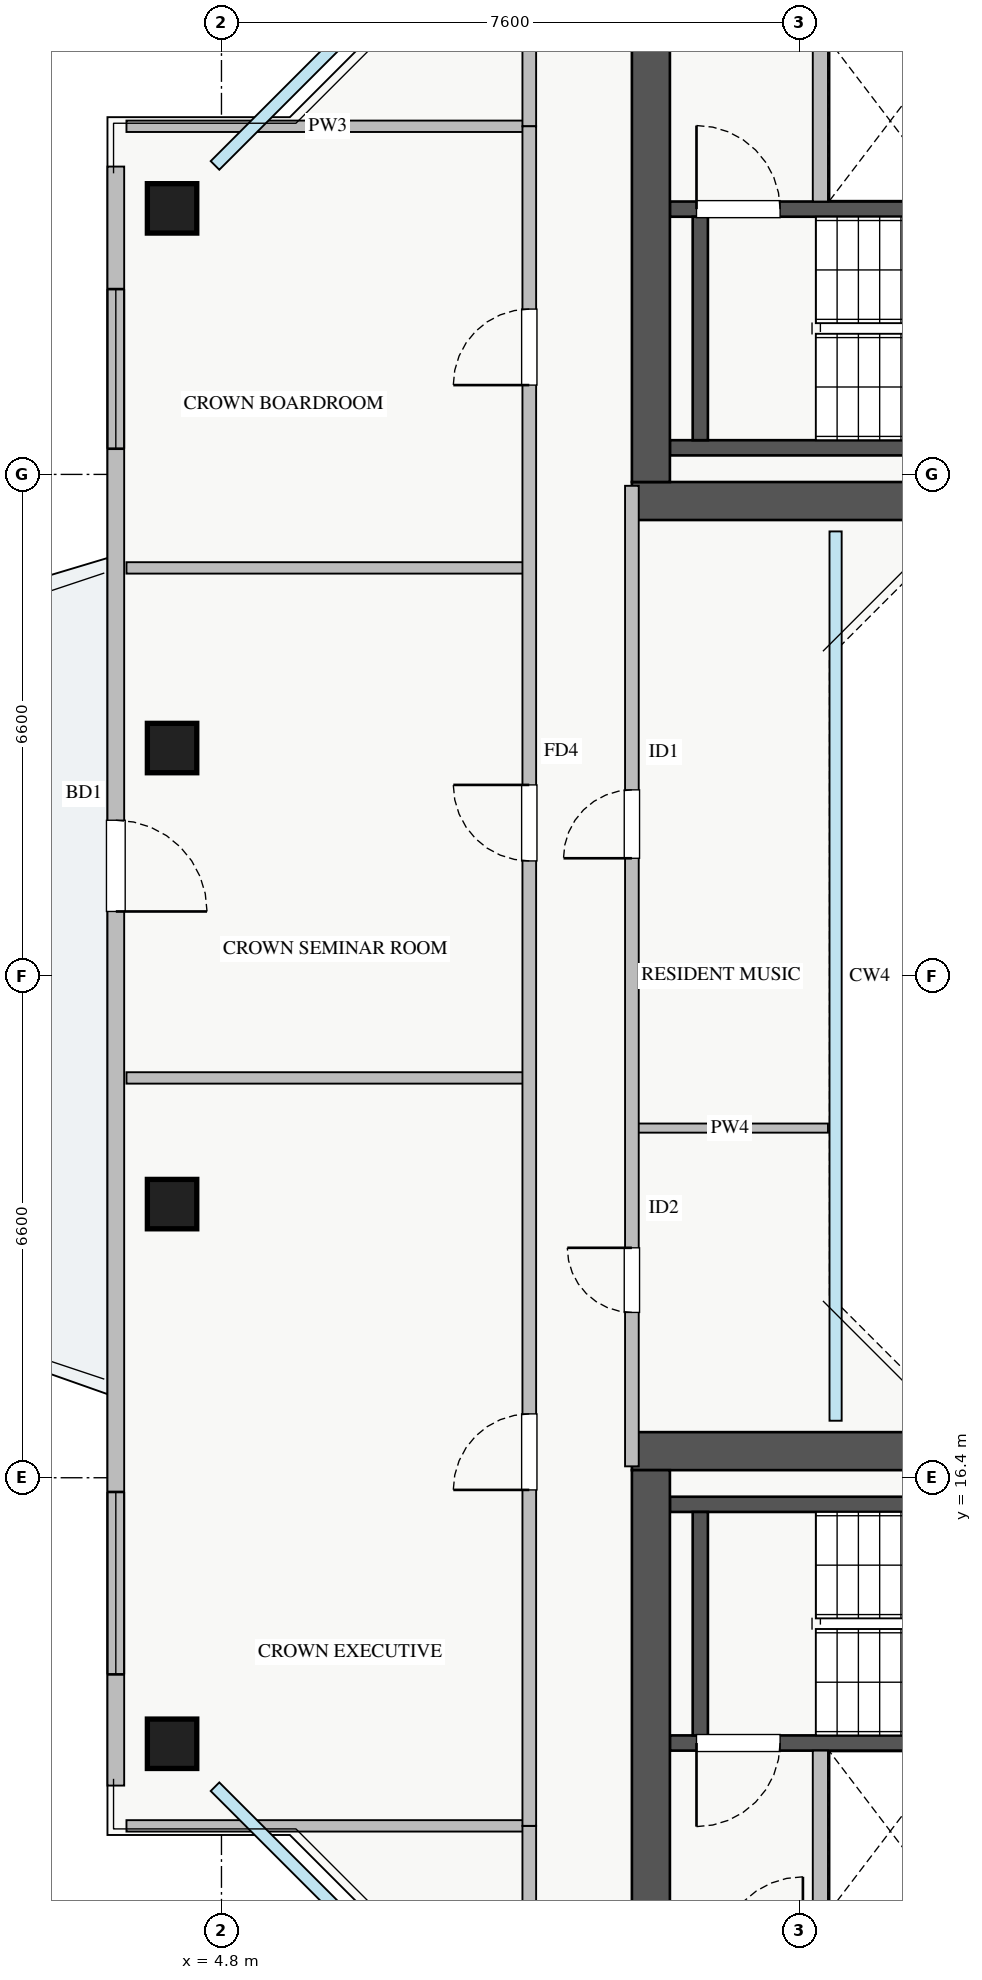
"""IFC4 building model, lengths in metres.
Left out: names, types, materials, properties, quantities, classifications, styles, units other than length and angle.
Written with IfcOpenShell. Run it as: python <this file> out.ifc"""

import sys

from ifc_helpers import new_model, si_unit, direction, frame, frame_2d, origin, origin_2d, place, context, subcontext, project, spatial, rectangle, extrude, source, transform, mapped, element, fill, save


model = new_model("IFC4")
c1 = context("Model", 3, precision=1e-05, world=origin(), true_north=direction((0.0, 1.0)))
c2 = subcontext(c1, "Body", "Model", "MODEL_VIEW")
j1 = project(units=[si_unit("LENGTHUNIT", "METRE"), si_unit("PLANEANGLEUNIT", "RADIAN")], contexts=[c1])
p1 = place(None, origin())
s1 = spatial("IfcSite", under=j1, at=p1, CompositionType="ELEMENT")
p2 = place(p1, origin())
s2 = spatial("IfcBuilding", under=s1, at=p2, CompositionType="ELEMENT")
p3 = place(p2, frame((0.0, 0.0, 240.5)))
s3 = spatial("IfcBuildingStorey", under=s2, at=p3, CompositionType="ELEMENT", Elevation=240.5)
for number, where, z_axis, x_axis in (
    (1, (12.68, 33.2, 0.0), (0.0, 0.0, 1.0), (1.0, 0.0, 0.0)),
    (2, (12.68, 12.8, 0.0), (0.0, 0.0, 1.0), (1.0, 0.0, 0.0)),
):
    element("IfcWall", number, at=place(p3, frame(where, z_axis=z_axis, x_axis=x_axis)), inside=s3, PredefinedType="SHEAR", context=c2, shape_type="SweptSolid", body=[
        extrude(rectangle(XDim=1.94, YDim=0.18, at=frame_2d((0.97, 0.0))), origin(), (0.0, 0.0, 1.0), 3.07),
    ])
p4 = place(p3, frame((10.7, 29.95, 0.0), z_axis=(0.0, 0.0, 1.0), x_axis=(1.0, 0.0, 0.0)))
e3 = element("IfcWall", 3, at=p4, inside=s3, PredefinedType="SHEAR", context=c2, shape_type="SweptSolid", body=[
    extrude(rectangle(XDim=7.45, YDim=0.2, at=frame_2d((3.725, 0.0))), origin(), (0.0, 0.0, 1.0), 3.25),
])
p5 = place(p3, frame((10.7, 33.09, 0.0), z_axis=(0.0, 0.0, 1.0), x_axis=(1.0, 0.0, 0.0)))
e4 = element("IfcWall", 4, at=p5, inside=s3, PredefinedType="SHEAR", context=c2, shape_type="SweptSolid", body=[
    extrude(rectangle(XDim=7.45, YDim=0.2, at=frame_2d((3.725, 0.0))), origin(), (0.0, 0.0, 1.0), 3.25),
])
p6 = place(p5, frame((0.35, 0.0, 0.0)))
e5 = element("IfcOpeningElement", 5, at=p6, cuts=e4, PredefinedType="OPENING", context=c2, shape_type="SweptSolid", body=[
    extrude(rectangle(XDim=1.1, YDim=2.05, at=frame_2d((0.55, 1.025))), frame((0.0, 0.11, 0.0), z_axis=(0.0, -1.0, 0.0), x_axis=(1.0, 0.0, 0.0)), (0.0, 0.0, 1.0), 0.22),
])
p7 = place(p3, frame((11.1, 30.05, 0.0), z_axis=(0.0, 0.0, 1.0), x_axis=(0.0, 1.0, 0.0)))
e6 = element("IfcWall", 6, at=p7, inside=s3, PredefinedType="SHEAR", context=c2, shape_type="SweptSolid", body=[
    extrude(rectangle(XDim=2.94, YDim=0.2, at=frame_2d((1.47, 0.0))), origin(), (0.0, 0.0, 1.0), 3.25),
])
p8 = place(p3, frame((10.7, 12.91, 0.0), z_axis=(0.0, 0.0, 1.0), x_axis=(1.0, 0.0, 0.0)))
e7 = element("IfcWall", 7, at=p8, inside=s3, PredefinedType="SHEAR", context=c2, shape_type="SweptSolid", body=[
    extrude(rectangle(XDim=7.45, YDim=0.2, at=frame_2d((3.725, 0.0))), origin(), (0.0, 0.0, 1.0), 3.25),
])
p9 = place(p8, frame((0.35, 0.0, 0.0)))
e8 = element("IfcOpeningElement", 8, at=p9, cuts=e7, PredefinedType="OPENING", context=c2, shape_type="SweptSolid", body=[
    extrude(rectangle(XDim=1.1, YDim=2.05, at=frame_2d((0.55, 1.025))), frame((0.0, 0.11, 0.0), z_axis=(0.0, -1.0, 0.0), x_axis=(1.0, 0.0, 0.0)), (0.0, 0.0, 1.0), 0.22),
])
p10 = place(p3, frame((10.7, 16.05, 0.0), z_axis=(0.0, 0.0, 1.0), x_axis=(1.0, 0.0, 0.0)))
e9 = element("IfcWall", 9, at=p10, inside=s3, PredefinedType="SHEAR", context=c2, shape_type="SweptSolid", body=[
    extrude(rectangle(XDim=7.45, YDim=0.2, at=frame_2d((3.725, 0.0))), origin(), (0.0, 0.0, 1.0), 3.25),
])
p11 = place(p3, frame((11.1, 13.01, 0.0), z_axis=(0.0, 0.0, 1.0), x_axis=(0.0, 1.0, 0.0)))
e10 = element("IfcWall", 10, at=p11, inside=s3, PredefinedType="SHEAR", context=c2, shape_type="SweptSolid", body=[
    extrude(rectangle(XDim=2.94, YDim=0.2, at=frame_2d((1.47, 0.0))), origin(), (0.0, 0.0, 1.0), 3.25),
])
p12 = place(p3, frame((10.2, 29.25, 0.0), z_axis=(0.0, 0.0, 1.0), x_axis=(1.0, 0.0, 0.0)))
e11 = element("IfcWall", 11, at=p12, inside=s3, PredefinedType="SHEAR", context=c2, shape_type="SweptSolid", body=[
    extrude(rectangle(XDim=17.6, YDim=0.5, at=frame_2d((8.8, 0.0))), origin(), (0.0, 0.0, 1.0), 3.25),
])
p13 = place(p3, frame((10.45, 29.5, 0.0), z_axis=(0.0, 0.0, 1.0), x_axis=(0.0, 1.0, 0.0)))
e12 = element("IfcWall", 12, at=p13, inside=s3, PredefinedType="SHEAR", context=c2, shape_type="SweptSolid", body=[
    extrude(rectangle(XDim=6.2, YDim=0.5, at=frame_2d((3.1, 0.0))), origin(), (0.0, 0.0, 1.0), 3.25),
])
p14 = place(p3, frame((10.2, 16.75, 0.0), z_axis=(0.0, 0.0, 1.0), x_axis=(1.0, 0.0, 0.0)))
e13 = element("IfcWall", 13, at=p14, inside=s3, PredefinedType="SHEAR", context=c2, shape_type="SweptSolid", body=[
    extrude(rectangle(XDim=17.6, YDim=0.5, at=frame_2d((8.8, 0.0))), origin(), (0.0, 0.0, 1.0), 3.25),
])
p15 = place(p3, frame((10.45, 10.3, 0.0), z_axis=(0.0, 0.0, 1.0), x_axis=(0.0, 1.0, 0.0)))
e14 = element("IfcWall", 14, at=p15, inside=s3, PredefinedType="SHEAR", context=c2, shape_type="SweptSolid", body=[
    extrude(rectangle(XDim=6.2, YDim=0.5, at=frame_2d((3.1, 0.0))), origin(), (0.0, 0.0, 1.0), 3.25),
])
m1 = source(origin(), c2, "Body", "SweptSolid", [
    extrude(rectangle(XDim=0.65, YDim=0.65, at=origin_2d()), origin(), (0.0, 0.0, 1.0), 3.25),
])
for number, where, z_axis, x_axis in (
    (15, (4.15, 33.1, 0.0), (0.0, 0.0, 1.0), (1.0, 0.0, 0.0)),
    (16, (4.15, 26.0, 0.0), (0.0, 0.0, 1.0), (1.0, 0.0, 0.0)),
    (17, (4.15, 20.0, 0.0), (0.0, 0.0, 1.0), (1.0, 0.0, 0.0)),
    (18, (4.15, 12.9, 0.0), (0.0, 0.0, 1.0), (1.0, 0.0, 0.0)),
):
    element("IfcColumn", number, at=place(p3, frame(where, z_axis=z_axis, x_axis=x_axis)), inside=s3, PredefinedType="COLUMN", context=c2, shape_type="MappedRepresentation", body=[
        mapped(m1, transform((0.0, 0.0, 0.0), x_axis=(1.0, 0.0, 0.0), y_axis=(0.0, 1.0, 0.0), z_axis=(0.0, 0.0, 1.0), scale=1.0)),
    ])
p16 = place(p3, frame((3.41, 12.35, 0.0), z_axis=(0.0, 0.0, 1.0), x_axis=(0.0, 1.0, 0.0)))
e19 = element("IfcWall", 19, at=p16, inside=s3, PredefinedType="STANDARD", context=c2, shape_type="SweptSolid", body=[
    extrude(rectangle(XDim=21.3, YDim=0.22, at=frame_2d((10.65, 0.0))), origin(), (0.0, 0.0, 1.0), 2.61),
])
p17 = place(p16, frame((11.5, 0.0, 0.0)))
e20 = element("IfcOpeningElement", 20, at=p17, cuts=e19, PredefinedType="OPENING", context=c2, shape_type="SweptSolid", body=[
    extrude(rectangle(XDim=1.2, YDim=2.1, at=frame_2d((0.6, 1.05))), frame((0.0, 0.12, 0.0), z_axis=(0.0, -1.0, 0.0), x_axis=(1.0, 0.0, 0.0)), (0.0, 0.0, 1.0), 0.24),
])
p18 = place(p16, frame((1.463, 0.0, 0.9)))
e21 = element("IfcOpeningElement", 21, at=p18, cuts=e19, PredefinedType="OPENING", context=c2, shape_type="SweptSolid", body=[
    extrude(rectangle(XDim=2.4, YDim=1.48, at=frame_2d((1.2, 0.74))), frame((0.0, 0.12, 0.0), z_axis=(0.0, -1.0, 0.0), x_axis=(1.0, 0.0, 0.0)), (0.0, 0.0, 1.0), 0.24),
])
p19 = place(p16, frame((17.588, 0.0, 0.9)))
e22 = element("IfcOpeningElement", 22, at=p19, cuts=e19, PredefinedType="OPENING", context=c2, shape_type="SweptSolid", body=[
    extrude(rectangle(XDim=2.1, YDim=1.48, at=frame_2d((1.05, 0.74))), frame((0.0, 0.12, 0.0), z_axis=(0.0, -1.0, 0.0), x_axis=(1.0, 0.0, 0.0)), (0.0, 0.0, 1.0), 0.24),
])
for number, where, z_axis, x_axis in (
    (23, (12.68, 33.19, 0.0), (0.0, 0.0, 1.0), (0.0, 1.0, 0.0)),
    (24, (12.68, 10.6, 0.0), (0.0, 0.0, 1.0), (0.0, 1.0, 0.0)),
):
    element("IfcWall", number, at=place(p3, frame(where, z_axis=z_axis, x_axis=x_axis)), inside=s3, PredefinedType="PARTITIONING", context=c2, shape_type="SweptSolid", body=[
        extrude(rectangle(XDim=2.21, YDim=0.2, at=frame_2d((1.105, 0.0))), origin(), (0.0, 0.0, 1.0), 3.07),
    ])
for number, where, z_axis, x_axis in (
    (25, (3.55, 34.18, 0.0), (0.0, 0.0, 1.0), (1.0, 0.0, 0.0)),
    (26, (3.55, 11.82, 0.0), (0.0, 0.0, 1.0), (1.0, 0.0, 0.0)),
):
    element("IfcWall", number, at=place(p3, frame(where, z_axis=z_axis, x_axis=x_axis)), inside=s3, PredefinedType="PARTITIONING", context=c2, shape_type="SweptSolid", body=[
        extrude(rectangle(XDim=5.3, YDim=0.15, at=frame_2d((2.65, 0.0))), origin(), (0.0, 0.0, 1.0), 3.07),
    ])
for number, where, z_axis, x_axis in (
    (27, (8.85, 34.18, 0.0), (0.0, 0.0, 1.0), (0.0, 1.0, 0.0)),
    (28, (8.85, 8.56, 0.0), (0.0, 0.0, 1.0), (0.0, 1.0, 0.0)),
):
    element("IfcWall", number, at=place(p3, frame(where, z_axis=z_axis, x_axis=x_axis)), inside=s3, PredefinedType="PARTITIONING", context=c2, shape_type="SweptSolid", body=[
        extrude(rectangle(XDim=3.26, YDim=0.18, at=frame_2d((1.63, 0.0))), origin(), (0.0, 0.0, 1.0), 2.569),
    ])
p20 = place(p3, frame((3.55, 21.66, 0.0), z_axis=(0.0, 0.0, 1.0), x_axis=(1.0, 0.0, 0.0)))
e29 = element("IfcWall", 29, at=p20, inside=s3, PredefinedType="PARTITIONING", context=c2, shape_type="SweptSolid", body=[
    extrude(rectangle(XDim=5.3, YDim=0.15, at=frame_2d((2.65, 0.0))), origin(), (0.0, 0.0, 1.0), 2.765),
])
p21 = place(p3, frame((3.55, 28.37, 0.0), z_axis=(0.0, 0.0, 1.0), x_axis=(1.0, 0.0, 0.0)))
e30 = element("IfcWall", 30, at=p21, inside=s3, PredefinedType="PARTITIONING", context=c2, shape_type="SweptSolid", body=[
    extrude(rectangle(XDim=5.3, YDim=0.15, at=frame_2d((2.65, 0.0))), origin(), (0.0, 0.0, 1.0), 3.07),
])
p22 = place(p3, frame((8.85, 11.82, 0.0), z_axis=(0.0, 0.0, 1.0), x_axis=(0.0, 1.0, 0.0)))
e31 = element("IfcWall", 31, at=p22, inside=s3, PredefinedType="PARTITIONING", context=c2, shape_type="SweptSolid", body=[
    extrude(rectangle(XDim=22.36, YDim=0.18, at=frame_2d((11.18, 0.0))), origin(), (0.0, 0.0, 1.0), 2.569),
])
p23 = place(p22, frame((4.42, 0.0, 0.0)))
e32 = element("IfcOpeningElement", 32, at=p23, cuts=e31, PredefinedType="OPENING", context=c2, shape_type="SweptSolid", body=[
    extrude(rectangle(XDim=1.0, YDim=2.05, at=frame_2d((0.5, 1.025))), frame((0.0, 0.1, 0.0), z_axis=(0.0, -1.0, 0.0), x_axis=(1.0, 0.0, 0.0)), (0.0, 0.0, 1.0), 0.2),
])
p24 = place(p22, frame((12.695, 0.0, 0.0)))
e33 = element("IfcOpeningElement", 33, at=p24, cuts=e31, PredefinedType="OPENING", context=c2, shape_type="SweptSolid", body=[
    extrude(rectangle(XDim=1.0, YDim=2.05, at=frame_2d((0.5, 1.025))), frame((0.0, 0.1, 0.0), z_axis=(0.0, -1.0, 0.0), x_axis=(1.0, 0.0, 0.0)), (0.0, 0.0, 1.0), 0.2),
])
p25 = place(p22, frame((18.955, 0.0, 0.0)))
e34 = element("IfcOpeningElement", 34, at=p25, cuts=e31, PredefinedType="OPENING", context=c2, shape_type="SweptSolid", body=[
    extrude(rectangle(XDim=1.0, YDim=2.05, at=frame_2d((0.5, 1.025))), frame((0.0, 0.1, 0.0), z_axis=(0.0, -1.0, 0.0), x_axis=(1.0, 0.0, 0.0)), (0.0, 0.0, 1.0), 0.2),
])
p26 = place(p3, frame((10.2, 21.0, 0.0), z_axis=(0.0, 0.0, 1.0), x_axis=(1.0, 0.0, 0.0)))
e35 = element("IfcWall", 35, at=p26, inside=s3, PredefinedType="PLUMBINGWALL", context=c2, shape_type="SweptSolid", body=[
    extrude(rectangle(XDim=2.58, YDim=0.12, at=frame_2d((1.29, 0.0))), origin(), (0.0, 0.0, 1.0), 3.07),
])
p27 = place(p3, frame((10.2, 16.55, 0.0), z_axis=(0.0, 0.0, 1.0), x_axis=(0.0, 1.0, 0.0)))
e36 = element("IfcWall", 36, at=p27, inside=s3, PredefinedType="PARTITIONING", context=c2, shape_type="SweptSolid", body=[
    extrude(rectangle(XDim=12.9, YDim=0.18, at=frame_2d((6.45, 0.0))), origin(), (0.0, 0.0, 1.0), 3.07),
])
p28 = place(p27, frame((2.025, 0.0, 0.0)))
e37 = element("IfcOpeningElement", 37, at=p28, cuts=e36, PredefinedType="OPENING", context=c2, shape_type="SweptSolid", body=[
    extrude(rectangle(XDim=0.85, YDim=2.05, at=frame_2d((0.425, 1.025))), frame((0.0, 0.1, 0.0), z_axis=(0.0, -1.0, 0.0), x_axis=(1.0, 0.0, 0.0)), (0.0, 0.0, 1.0), 0.2),
])
p29 = place(p27, frame((8.0, 0.0, 0.0)))
e38 = element("IfcOpeningElement", 38, at=p29, cuts=e36, PredefinedType="OPENING", context=c2, shape_type="SweptSolid", body=[
    extrude(rectangle(XDim=0.9, YDim=2.05, at=frame_2d((0.45, 1.025))), frame((0.0, 0.1, 0.0), z_axis=(0.0, -1.0, 0.0), x_axis=(1.0, 0.0, 0.0)), (0.0, 0.0, 1.0), 0.2),
])
m2 = source(origin(), c2, "Body", "SweptSolid", [
    extrude(rectangle(XDim=1.2, YDim=2.1, at=frame_2d((0.6, 1.05))), frame((0.0, 0.025, 0.0), z_axis=(0.0, -1.0, 0.0), x_axis=(1.0, 0.0, 0.0)), (0.0, 0.0, 1.0), 0.05),
])
p30 = place(p17, frame((1.2, 0.0, 0.0), z_axis=(0.0, 0.0, 1.0), x_axis=(-1.0, 0.0, 0.0)))
e39 = element("IfcDoor", 39, at=p30, inside=s3, OperationType="SINGLE_SWING_LEFT", PredefinedType="DOOR", context=c2, shape_type="MappedRepresentation", body=[
    mapped(m2, transform((0.0, 0.0, 0.0), x_axis=(1.0, 0.0, 0.0), y_axis=(0.0, 1.0, 0.0), z_axis=(0.0, 0.0, 1.0), scale=1.0)),
])
fill(e20, e39)
m3 = source(origin(), c2, "Body", "SweptSolid", [
    extrude(rectangle(XDim=2.4, YDim=1.48, at=frame_2d((1.2, 0.74))), frame((0.0, 0.03, 0.0), z_axis=(0.0, -1.0, 0.0), x_axis=(1.0, 0.0, 0.0)), (0.0, 0.0, 1.0), 0.06),
])
p31 = place(p18, origin())
e40 = element("IfcWindow", 40, at=p31, inside=s3, PartitioningType="TRIPLE_PANEL_VERTICAL", PredefinedType="WINDOW", context=c2, shape_type="MappedRepresentation", body=[
    mapped(m3, transform((0.0, 0.0, 0.0), x_axis=(1.0, 0.0, 0.0), y_axis=(0.0, 1.0, 0.0), z_axis=(0.0, 0.0, 1.0), scale=1.0)),
])
fill(e21, e40)
m4 = source(origin(), c2, "Body", "SweptSolid", [
    extrude(rectangle(XDim=2.1, YDim=1.48, at=frame_2d((1.05, 0.74))), frame((0.0, 0.03, 0.0), z_axis=(0.0, -1.0, 0.0), x_axis=(1.0, 0.0, 0.0)), (0.0, 0.0, 1.0), 0.06),
])
p32 = place(p19, origin())
e41 = element("IfcWindow", 41, at=p32, inside=s3, PartitioningType="TRIPLE_PANEL_VERTICAL", PredefinedType="WINDOW", context=c2, shape_type="MappedRepresentation", body=[
    mapped(m4, transform((0.0, 0.0, 0.0), x_axis=(1.0, 0.0, 0.0), y_axis=(0.0, 1.0, 0.0), z_axis=(0.0, 0.0, 1.0), scale=1.0)),
])
fill(e22, e41)
m5 = source(origin(), c2, "Body", "SweptSolid", [
    extrude(rectangle(XDim=1.1, YDim=2.05, at=frame_2d((0.55, 1.025))), frame((0.0, 0.025, 0.0), z_axis=(0.0, -1.0, 0.0), x_axis=(1.0, 0.0, 0.0)), (0.0, 0.0, 1.0), 0.05),
])
p33 = place(p6, origin())
e42 = element("IfcDoor", 42, at=p33, inside=s3, OperationType="SINGLE_SWING_LEFT", PredefinedType="DOOR", context=c2, shape_type="MappedRepresentation", body=[
    mapped(m5, transform((0.0, 0.0, 0.0), x_axis=(1.0, 0.0, 0.0), y_axis=(0.0, 1.0, 0.0), z_axis=(0.0, 0.0, 1.0), scale=1.0)),
])
fill(e5, e42)
p34 = place(p9, frame((1.1, 0.0, 0.0), z_axis=(0.0, 0.0, 1.0), x_axis=(-1.0, 0.0, 0.0)))
e43 = element("IfcDoor", 43, at=p34, inside=s3, OperationType="SINGLE_SWING_LEFT", PredefinedType="DOOR", context=c2, shape_type="MappedRepresentation", body=[
    mapped(m5, transform((0.0, 0.0, 0.0), x_axis=(1.0, 0.0, 0.0), y_axis=(0.0, 1.0, 0.0), z_axis=(0.0, 0.0, 1.0), scale=1.0)),
])
fill(e8, e43)
m6 = source(origin(), c2, "Body", "SweptSolid", [
    extrude(rectangle(XDim=1.0, YDim=2.05, at=frame_2d((0.5, 1.025))), frame((0.0, 0.025, 0.0), z_axis=(0.0, -1.0, 0.0), x_axis=(1.0, 0.0, 0.0)), (0.0, 0.0, 1.0), 0.05),
])
p35 = place(p23, origin())
e44 = element("IfcDoor", 44, at=p35, inside=s3, OperationType="SINGLE_SWING_LEFT", PredefinedType="DOOR", context=c2, shape_type="MappedRepresentation", body=[
    mapped(m6, transform((0.0, 0.0, 0.0), x_axis=(1.0, 0.0, 0.0), y_axis=(0.0, 1.0, 0.0), z_axis=(0.0, 0.0, 1.0), scale=1.0)),
])
fill(e32, e44)
p36 = place(p24, origin())
e45 = element("IfcDoor", 45, at=p36, inside=s3, OperationType="SINGLE_SWING_RIGHT", PredefinedType="DOOR", context=c2, shape_type="MappedRepresentation", body=[
    mapped(m6, transform((0.0, 0.0, 0.0), x_axis=(1.0, 0.0, 0.0), y_axis=(0.0, 1.0, 0.0), z_axis=(0.0, 0.0, 1.0), scale=1.0)),
])
fill(e33, e45)
p37 = place(p25, origin())
e46 = element("IfcDoor", 46, at=p37, inside=s3, OperationType="SINGLE_SWING_LEFT", PredefinedType="DOOR", context=c2, shape_type="MappedRepresentation", body=[
    mapped(m6, transform((0.0, 0.0, 0.0), x_axis=(1.0, 0.0, 0.0), y_axis=(0.0, 1.0, 0.0), z_axis=(0.0, 0.0, 1.0), scale=1.0)),
])
fill(e34, e46)
m7 = source(origin(), c2, "Body", "SweptSolid", [
    extrude(rectangle(XDim=0.85, YDim=2.05, at=frame_2d((0.425, 1.025))), frame((0.0, 0.025, 0.0), z_axis=(0.0, -1.0, 0.0), x_axis=(1.0, 0.0, 0.0)), (0.0, 0.0, 1.0), 0.05),
])
p38 = place(p28, origin())
e47 = element("IfcDoor", 47, at=p38, inside=s3, OperationType="SINGLE_SWING_RIGHT", PredefinedType="DOOR", context=c2, shape_type="MappedRepresentation", body=[
    mapped(m7, transform((0.0, 0.0, 0.0), x_axis=(1.0, 0.0, 0.0), y_axis=(0.0, 1.0, 0.0), z_axis=(0.0, 0.0, 1.0), scale=1.0)),
])
fill(e37, e47)
m8 = source(origin(), c2, "Body", "SweptSolid", [
    extrude(rectangle(XDim=0.9, YDim=2.05, at=frame_2d((0.45, 1.025))), frame((0.0, 0.025, 0.0), z_axis=(0.0, -1.0, 0.0), x_axis=(1.0, 0.0, 0.0)), (0.0, 0.0, 1.0), 0.05),
])
p39 = place(p29, origin())
e48 = element("IfcDoor", 48, at=p39, inside=s3, OperationType="SINGLE_SWING_LEFT", PredefinedType="DOOR", context=c2, shape_type="MappedRepresentation", body=[
    mapped(m8, transform((0.0, 0.0, 0.0), x_axis=(1.0, 0.0, 0.0), y_axis=(0.0, 1.0, 0.0), z_axis=(0.0, 0.0, 1.0), scale=1.0)),
])
fill(e38, e48)
save(model, sys.argv[1])
